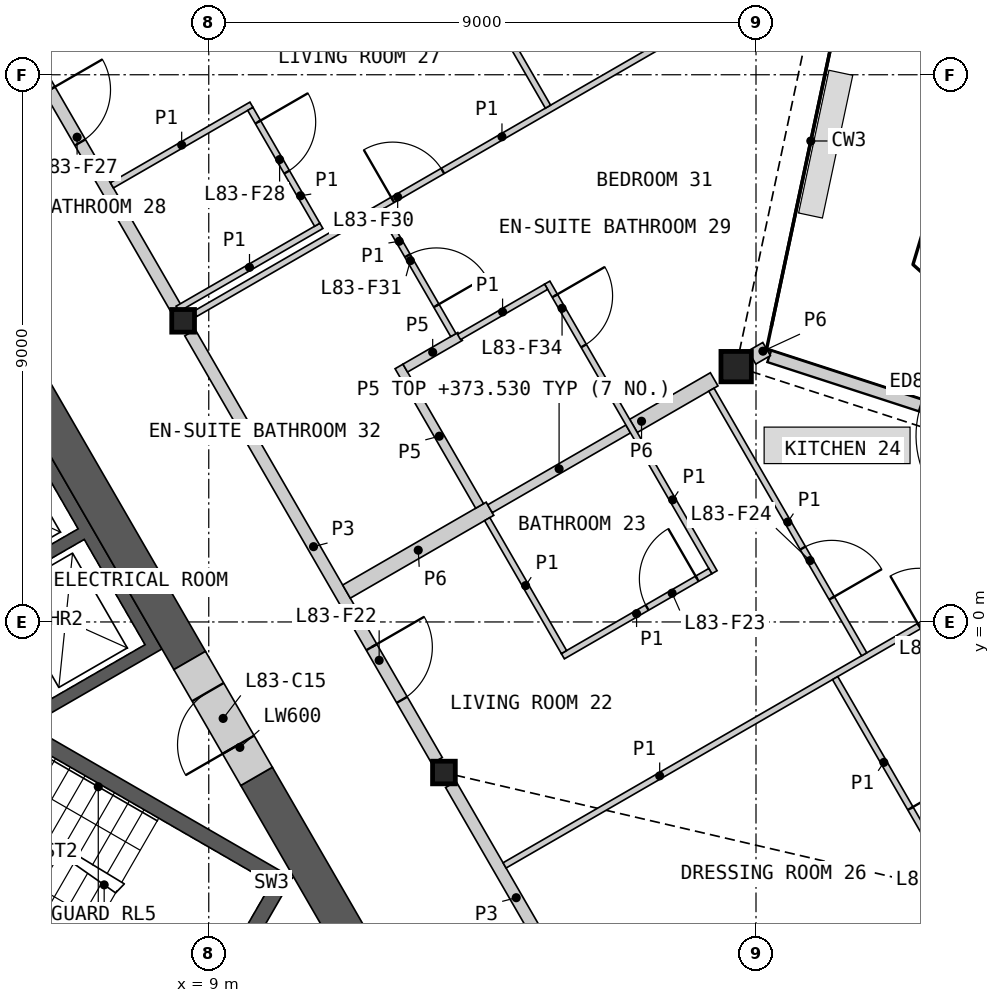
"""IFC4 building model, lengths in metres.
Left out: names, types, materials, properties, quantities, classifications, styles, units other than length and angle.
Written with IfcOpenShell. Run it as: python <this file> out.ifc"""

import sys

from ifc_helpers import new_model, si_unit, direction, frame, frame_2d, origin, origin_2d, place, context, subcontext, project, spatial, polyline, rectangle, hollow_rectangle, i_section, outline, extrude, element, fill, save


model = new_model("IFC4")
c1 = context("Model", 3, precision=1e-05, world=origin(), true_north=direction((0.0, 1.0)))
c2 = subcontext(c1, "Body", "Model", "MODEL_VIEW")
j1 = project(units=[si_unit("LENGTHUNIT", "METRE"), si_unit("PLANEANGLEUNIT", "RADIAN")], contexts=[c1])
p1 = place(None, origin())
s1 = spatial("IfcSite", under=j1, at=p1, CompositionType="ELEMENT")
p2 = place(p1, origin())
s2 = spatial("IfcBuilding", under=s1, at=p2, CompositionType="ELEMENT")
p3 = place(p2, frame((0.0, 0.0, 371.2)))
s3 = spatial("IfcBuildingStorey", under=s2, at=p3, CompositionType="ELEMENT", Elevation=371.2)
p4 = place(p3, frame((17.674, 4.199, 0.0), z_axis=(0.0, 0.0, 1.0), x_axis=(1.0, 0.0, 0.0)))
e1 = element("IfcColumn", 1, at=p4, inside=s3, PredefinedType="COLUMN", context=c2, shape_type="SweptSolid", body=[
    extrude(hollow_rectangle(XDim=0.5, YDim=0.5, WallThickness=0.03, at=origin_2d()), origin(), (0.0, 0.0, 1.0), 3.4),
])
for number, where, z_axis, x_axis in (
    (2, (12.868, -2.476, 0.0), (0.0, 0.0, 1.0), (1.0, 0.0, 0.0)),
    (3, (8.578, 4.953, 0.0), (0.0, 0.0, 1.0), (1.0, 0.0, 0.0)),
):
    element("IfcColumn", number, at=place(p3, frame(where, z_axis=z_axis, x_axis=x_axis)), inside=s3, PredefinedType="COLUMN", context=c2, shape_type="SweptSolid", body=[
        extrude(i_section(OverallWidth=0.374, OverallDepth=0.372, WebThickness=0.016, FlangeThickness=0.026, at=origin_2d()), origin(), (0.0, 0.0, 1.0), 3.4),
    ])
p5 = place(p3, frame((24.45, 2.344, 0.0), z_axis=(0.0, 0.0, 1.0), x_axis=(-0.951062538214, 0.308998460199, 0.0)))
e4 = element("IfcWall", 4, at=p5, inside=s3, PredefinedType="SOLIDWALL", context=c2, shape_type="SweptSolid", body=[
    extrude(rectangle(XDim=6.553, YDim=0.2, at=frame_2d((3.277, 0.0))), origin(), (0.0, 0.0, 1.0), 2.634),
])
p6 = place(p5, frame((2.333, 0.0, 0.0)))
e5 = element("IfcOpeningElement", 5, at=p6, cuts=e4, PredefinedType="OPENING", context=c2, shape_type="SweptSolid", body=[
    extrude(rectangle(XDim=1.6, YDim=2.25, at=frame_2d((0.8, 1.125))), frame((0.0, 0.11, 0.0), z_axis=(0.0, -1.0, 0.0), x_axis=(1.0, 0.0, 0.0)), (0.0, 0.0, 1.0), 0.22),
])
p7 = place(p3, origin())
e6 = element("IfcWall", 6, at=p7, inside=s3, PredefinedType="SHEAR", context=c2, shape_type="SweptSolid", body=[
    extrude(outline(polyline([(1.561, 6.097), (3.731, 7.35), (8.231, -0.444), (6.061, -1.697), (5.96, -1.524), (7.952, -0.374), (6.952, 1.358), (4.96, 0.208), (4.861, 0.381), (6.852, 1.531), (5.852, 3.263), (3.861, 2.113), (3.76, 2.287), (5.752, 3.437), (4.752, 5.169), (2.76, 4.019), (2.66, 4.192), (4.652, 5.342), (3.652, 7.074), (1.66, 5.924), (1.561, 6.097)])), origin(), (0.0, 0.0, 1.0), 3.1),
])
p8 = place(p3, origin())
e7 = element("IfcWall", 7, at=p8, inside=s3, PredefinedType="SHEAR", context=c2, shape_type="SweptSolid", body=[
    extrude(outline(polyline([(3.763, -3.956), (8.83, -6.881), (8.738, -6.539), (3.888, -3.739), (3.763, -3.956)])), origin(), (0.0, 0.0, 1.0), 3.1),
])
p9 = place(p3, origin())
e8 = element("IfcWall", 8, at=p9, inside=s3, PredefinedType="SHEAR", context=c2, shape_type="SweptSolid", body=[
    extrude(outline(polyline([(8.83, -6.881), (10.374, -4.206), (10.032, -4.298), (8.738, -6.539), (8.83, -6.881)])), origin(), (0.0, 0.0, 1.0), 3.1),
])
p10 = place(p3, origin())
e9 = element("IfcWall", 9, at=p10, inside=s3, PredefinedType="SHEAR", context=c2, shape_type="SweptSolid", body=[
    extrude(outline(polyline([(10.032, -4.298), (10.374, -4.206), (5.307, -1.281), (5.182, -1.498), (10.032, -4.298)])), origin(), (0.0, 0.0, 1.0), 3.1),
])
p11 = place(p3, frame((8.686, -0.634, 0.0), z_axis=(0.0, 0.0, 1.0), x_axis=(-0.500004601921, 0.866022746848, 0.0)))
e10 = element("IfcWall", 10, at=p11, inside=s3, PredefinedType="SHEAR", context=c2, shape_type="SweptSolid", body=[
    extrude(rectangle(XDim=16.853, YDim=0.6, at=frame_2d((8.426, 0.0))), origin(), (0.0, 0.0, 1.0), 3.1),
])
p12 = place(p3, frame((12.221, -6.756, 0.0), z_axis=(0.0, 0.0, 1.0), x_axis=(-0.50000604952, 0.866021911064, 0.0)))
e11 = element("IfcWall", 11, at=p12, inside=s3, PredefinedType="SHEAR", context=c2, shape_type="SweptSolid", body=[
    extrude(rectangle(XDim=4.869, YDim=0.6, at=frame_2d((2.434, 0.0))), origin(), (0.0, 0.0, 1.0), 3.1),
])
p13 = place(p3, frame((9.786, -2.539, 0.0), z_axis=(0.0, 0.0, 1.0), x_axis=(-0.499981787252, 0.866035918664, 0.0)))
e12 = element("IfcWall", 12, at=p13, inside=s3, PredefinedType="SHEAR", context=c2, shape_type="SweptSolid", body=[
    extrude(rectangle(XDim=2.2, YDim=0.6, at=frame_2d((1.1, 0.0))), origin(), (0.0, 0.0, 1.0), 3.1),
])
p14 = place(p13, frame((0.6, 0.0, 0.0)))
e13 = element("IfcOpeningElement", 13, at=p14, cuts=e12, PredefinedType="OPENING", context=c2, shape_type="SweptSolid", body=[
    extrude(rectangle(XDim=1.0, YDim=2.1, at=frame_2d((0.5, 1.05))), frame((0.0, 0.31, 0.0), z_axis=(0.0, -1.0, 0.0), x_axis=(1.0, 0.0, 0.0)), (0.0, 0.0, 1.0), 0.62),
])
p15 = place(p3, frame((4.403, 12.185, 0.0), z_axis=(0.0, 0.0, 1.0), x_axis=(0.499992155518, -0.866029932751, 0.0)))
e14 = element("IfcWall", 14, at=p15, inside=s3, PredefinedType="PARTITIONING", context=c2, shape_type="SweptSolid", body=[
    extrude(rectangle(XDim=8.123, YDim=0.2, at=frame_2d((4.062, 0.0))), origin(), (0.0, 0.0, 1.0), 3.1),
])
p16 = place(p15, frame((3.963, 0.0, 0.0)))
e15 = element("IfcOpeningElement", 15, at=p16, cuts=e14, PredefinedType="OPENING", context=c2, shape_type="SweptSolid", body=[
    extrude(rectangle(XDim=1.0, YDim=2.1, at=frame_2d((0.5, 1.05))), frame((0.0, 0.11, 0.0), z_axis=(0.0, -1.0, 0.0), x_axis=(1.0, 0.0, 0.0)), (0.0, 0.0, 1.0), 0.22),
])
p17 = place(p3, frame((8.692, 4.756, 0.0), z_axis=(0.0, 0.0, 1.0), x_axis=(0.500001682468, -0.866024432409, 0.0)))
e16 = element("IfcWall", 16, at=p17, inside=s3, PredefinedType="PARTITIONING", context=c2, shape_type="SweptSolid", body=[
    extrude(rectangle(XDim=8.124, YDim=0.2, at=frame_2d((4.062, 0.0))), origin(), (0.0, 0.0, 1.0), 3.1),
])
p18 = place(p17, frame((5.97, 0.0, 0.0)))
e17 = element("IfcOpeningElement", 17, at=p18, cuts=e16, PredefinedType="OPENING", context=c2, shape_type="SweptSolid", body=[
    extrude(rectangle(XDim=1.0, YDim=2.1, at=frame_2d((0.5, 1.05))), frame((0.0, 0.11, 0.0), z_axis=(0.0, -1.0, 0.0), x_axis=(1.0, 0.0, 0.0)), (0.0, 0.0, 1.0), 0.22),
])
p19 = place(p3, frame((12.981, -2.673, 0.0), z_axis=(0.0, 0.0, 1.0), x_axis=(0.499986217557, -0.866033360935, 0.0)))
e18 = element("IfcWall", 18, at=p19, inside=s3, PredefinedType="PARTITIONING", context=c2, shape_type="SweptSolid", body=[
    extrude(rectangle(XDim=4.3, YDim=0.2, at=frame_2d((2.15, 0.0))), origin(), (0.0, 0.0, 1.0), 3.1),
])
p20 = place(p3, frame((11.265, 0.5, 0.0), z_axis=(0.0, 0.0, 1.0), x_axis=(0.866051307416, 0.49995513091, 0.0)))
e19 = element("IfcWall", 19, at=p20, inside=s3, PredefinedType="PARTITIONING", context=c2, shape_type="SweptSolid", body=[
    extrude(rectangle(XDim=2.725, YDim=0.25, at=frame_2d((1.362, 0.0))), origin(), (0.0, 0.0, 1.0), 2.33),
])
p21 = place(p3, frame((15.985, 3.224, 0.0), z_axis=(0.0, 0.0, 1.0), x_axis=(0.865989259495, 0.50006259852, 0.0)))
e20 = element("IfcWall", 20, at=p21, inside=s3, PredefinedType="PARTITIONING", context=c2, shape_type="SweptSolid", body=[
    extrude(rectangle(XDim=1.532, YDim=0.25, at=frame_2d((0.766, 0.0))), origin(), (0.0, 0.0, 1.0), 2.33),
])
p22 = place(p3, frame((17.934, 4.35, 0.0), z_axis=(0.0, 0.0, 1.0), x_axis=(0.866288059981, 0.499544789918, 0.0)))
e21 = element("IfcWall", 21, at=p22, inside=s3, PredefinedType="PARTITIONING", context=c2, shape_type="SweptSolid", body=[
    extrude(rectangle(XDim=0.278, YDim=0.25, at=frame_2d((0.139, 0.0))), origin(), (0.0, 0.0, 1.0), 2.33),
])
p23 = place(p3, frame((13.625, 1.862, 0.0), z_axis=(0.0, 0.0, 1.0), x_axis=(0.866013657776, 0.500020344131, 0.0)))
e22 = element("IfcWall", 22, at=p23, inside=s3, PredefinedType="PLUMBINGWALL", context=c2, shape_type="SweptSolid", body=[
    extrude(rectangle(XDim=2.625, YDim=0.15, at=frame_2d((1.312, 0.0))), origin(), (0.0, 0.0, 1.0), 2.33),
])
p24 = place(p3, frame((12.129, 4.203, 0.0), z_axis=(0.0, 0.0, 1.0), x_axis=(0.499993606316, -0.866029095148, 0.0)))
e23 = element("IfcWall", 23, at=p24, inside=s3, PredefinedType="PLUMBINGWALL", context=c2, shape_type="SweptSolid", body=[
    extrude(rectangle(XDim=2.65, YDim=0.15, at=frame_2d((1.325, 0.0))), origin(), (0.0, 0.0, 1.0), 2.33),
])
p25 = place(p3, frame((12.232, 4.175, 0.0), z_axis=(0.0, 0.0, 1.0), x_axis=(0.866056787991, 0.499945637019, 0.0)))
e24 = element("IfcWall", 24, at=p25, inside=s3, PredefinedType="PLUMBINGWALL", context=c2, shape_type="SweptSolid", body=[
    extrude(rectangle(XDim=1.042, YDim=0.15, at=frame_2d((0.521, 0.0))), origin(), (0.0, 0.0, 1.0), 2.33),
])
p26 = place(p3, frame((13.865, -4.004, 0.0), z_axis=(0.0, 0.0, 1.0), x_axis=(0.866023404247, 0.500003463284, 0.0)))
e25 = element("IfcWall", 25, at=p26, inside=s3, PredefinedType="PARTITIONING", context=c2, shape_type="SweptSolid", body=[
    extrude(rectangle(XDim=11.782, YDim=0.1, at=frame_2d((5.891, 0.0))), origin(), (0.0, 0.0, 1.0), 2.33),
])
p27 = place(p26, frame((7.874, 0.0, 0.0)))
e26 = element("IfcOpeningElement", 26, at=p27, cuts=e25, PredefinedType="OPENING", context=c2, shape_type="SweptSolid", body=[
    extrude(rectangle(XDim=0.95, YDim=2.1, at=frame_2d((0.475, 1.05))), frame((0.0, 0.06, 0.0), z_axis=(0.0, -1.0, 0.0), x_axis=(1.0, 0.0, 0.0)), (0.0, 0.0, 1.0), 0.12),
])
p28 = place(p3, frame((8.775, 5.066, 0.0), z_axis=(0.0, 0.0, 1.0), x_axis=(0.866023724155, 0.500002909193, 0.0)))
e27 = element("IfcWall", 27, at=p28, inside=s3, PredefinedType="PARTITIONING", context=c2, shape_type="SweptSolid", body=[
    extrude(rectangle(XDim=11.655, YDim=0.1, at=frame_2d((5.827, 0.0))), origin(), (0.0, 0.0, 1.0), 2.33),
])
p29 = place(p28, frame((3.751, 0.0, 0.0)))
e28 = element("IfcOpeningElement", 28, at=p29, cuts=e27, PredefinedType="OPENING", context=c2, shape_type="SweptSolid", body=[
    extrude(rectangle(XDim=0.95, YDim=2.1, at=frame_2d((0.475, 1.05))), frame((0.0, 0.06, 0.0), z_axis=(0.0, -1.0, 0.0), x_axis=(1.0, 0.0, 0.0)), (0.0, 0.0, 1.0), 0.12),
])
p30 = place(p3, frame((19.302, -0.923, 0.0), z_axis=(0.0, 0.0, 1.0), x_axis=(0.499999516514, -0.866025682925, 0.0)))
e29 = element("IfcWall", 29, at=p30, inside=s3, PredefinedType="PARTITIONING", context=c2, shape_type="SweptSolid", body=[
    extrude(rectangle(XDim=6.407, YDim=0.1, at=frame_2d((3.204, 0.0))), origin(), (0.0, 0.0, 1.0), 2.33),
])
p31 = place(p30, frame((2.476, 0.0, 0.0)))
e30 = element("IfcOpeningElement", 30, at=p31, cuts=e29, PredefinedType="OPENING", context=c2, shape_type="SweptSolid", body=[
    extrude(rectangle(XDim=0.95, YDim=2.1, at=frame_2d((0.475, 1.05))), frame((0.0, 0.06, 0.0), z_axis=(0.0, -1.0, 0.0), x_axis=(1.0, 0.0, 0.0)), (0.0, 0.0, 1.0), 0.12),
])
p32 = place(p3, frame((14.567, 5.581, 0.0), z_axis=(0.0, 0.0, 1.0), x_axis=(0.499996545922, -0.866027397988, 0.0)))
e31 = element("IfcWall", 31, at=p32, inside=s3, PredefinedType="PARTITIONING", context=c2, shape_type="SweptSolid", body=[
    extrude(rectangle(XDim=5.5, YDim=0.1, at=frame_2d((2.75, 0.0))), origin(), (0.0, 0.0, 1.0), 2.33),
])
p33 = place(p32, frame((0.25, 0.0, 0.0)))
e32 = element("IfcOpeningElement", 32, at=p33, cuts=e31, PredefinedType="OPENING", context=c2, shape_type="SweptSolid", body=[
    extrude(rectangle(XDim=0.95, YDim=2.1, at=frame_2d((0.475, 1.05))), frame((0.0, 0.06, 0.0), z_axis=(0.0, -1.0, 0.0), x_axis=(1.0, 0.0, 0.0)), (0.0, 0.0, 1.0), 0.12),
])
p34 = place(p3, frame((12.029, 12.892, 0.0), z_axis=(0.0, 0.0, 1.0), x_axis=(0.500005610874, -0.86602216432, 0.0)))
e33 = element("IfcWall", 33, at=p34, inside=s3, PredefinedType="PARTITIONING", context=c2, shape_type="SweptSolid", body=[
    extrude(rectangle(XDim=5.1, YDim=0.1, at=frame_2d((2.55, 0.0))), origin(), (0.0, 0.0, 1.0), 2.33),
])
p35 = place(p34, frame((2.075, 0.0, 0.0)))
e34 = element("IfcOpeningElement", 34, at=p35, cuts=e33, PredefinedType="OPENING", context=c2, shape_type="SweptSolid", body=[
    extrude(rectangle(XDim=0.95, YDim=2.1, at=frame_2d((0.475, 1.05))), frame((0.0, 0.06, 0.0), z_axis=(0.0, -1.0, 0.0), x_axis=(1.0, 0.0, 0.0)), (0.0, 0.0, 1.0), 0.12),
])
p36 = place(p3, frame((17.266, 3.82, 0.0), z_axis=(0.0, 0.0, 1.0), x_axis=(0.499990214365, -0.86603105345, 0.0)))
e35 = element("IfcWall", 35, at=p36, inside=s3, PredefinedType="PARTITIONING", context=c2, shape_type="SweptSolid", body=[
    extrude(rectangle(XDim=5.025, YDim=0.1, at=frame_2d((2.512, 0.0))), origin(), (0.0, 0.0, 1.0), 2.33),
])
p37 = place(p36, frame((3.008, 0.0, 0.0)))
e36 = element("IfcOpeningElement", 36, at=p37, cuts=e35, PredefinedType="OPENING", context=c2, shape_type="SweptSolid", body=[
    extrude(rectangle(XDim=0.95, YDim=2.1, at=frame_2d((0.475, 1.05))), frame((0.0, 0.06, 0.0), z_axis=(0.0, -1.0, 0.0), x_axis=(1.0, 0.0, 0.0)), (0.0, 0.0, 1.0), 0.12),
])
p38 = place(p3, frame((14.823, -0.564, 0.0), z_axis=(0.0, 0.0, 1.0), x_axis=(0.866034573852, 0.49998411664, 0.0)))
e37 = element("IfcWall", 37, at=p38, inside=s3, PredefinedType="PARTITIONING", context=c2, shape_type="SweptSolid", body=[
    extrude(rectangle(XDim=2.8, YDim=0.1, at=frame_2d((1.4, 0.0))), origin(), (0.0, 0.0, 1.0), 2.33),
])
p39 = place(p38, frame((1.6, 0.0, 0.0)))
e38 = element("IfcOpeningElement", 38, at=p39, cuts=e37, PredefinedType="OPENING", context=c2, shape_type="SweptSolid", body=[
    extrude(rectangle(XDim=0.95, YDim=2.1, at=frame_2d((0.475, 1.05))), frame((0.0, 0.06, 0.0), z_axis=(0.0, -1.0, 0.0), x_axis=(1.0, 0.0, 0.0)), (0.0, 0.0, 1.0), 0.12),
])
p40 = place(p3, frame((13.579, 1.691, 0.0), z_axis=(0.0, 0.0, 1.0), x_axis=(0.500048846702, -0.865997200291, 0.0)))
e39 = element("IfcWall", 39, at=p40, inside=s3, PredefinedType="PARTITIONING", context=c2, shape_type="SweptSolid", body=[
    extrude(rectangle(XDim=2.525, YDim=0.1, at=frame_2d((1.263, 0.0))), origin(), (0.0, 0.0, 1.0), 2.33),
])
p41 = place(p3, frame((7.407, 7.182, 0.0), z_axis=(0.0, 0.0, 1.0), x_axis=(0.866052124492, 0.499953715521, 0.0)))
e40 = element("IfcWall", 40, at=p41, inside=s3, PredefinedType="PARTITIONING", context=c2, shape_type="SweptSolid", body=[
    extrude(rectangle(XDim=2.65, YDim=0.1, at=frame_2d((1.325, 0.0))), origin(), (0.0, 0.0, 1.0), 2.33),
])
p42 = place(p3, frame((8.488, 5.15, 0.0), z_axis=(0.0, 0.0, 1.0), x_axis=(0.866027727466, 0.499995975244, 0.0)))
e41 = element("IfcWall", 41, at=p42, inside=s3, PredefinedType="PARTITIONING", context=c2, shape_type="SweptSolid", body=[
    extrude(rectangle(XDim=2.73, YDim=0.1, at=frame_2d((1.365, 0.0))), origin(), (0.0, 0.0, 1.0), 2.33),
])
p43 = place(p3, frame((11.835, 6.775, 0.0), z_axis=(0.0, 0.0, 1.0), x_axis=(0.500030943131, -0.866007538022, 0.0)))
e42 = element("IfcWall", 42, at=p43, inside=s3, PredefinedType="PARTITIONING", context=c2, shape_type="SweptSolid", body=[
    extrude(rectangle(XDim=2.375, YDim=0.1, at=frame_2d((1.188, 0.0))), origin(), (0.0, 0.0, 1.0), 2.33),
])
p44 = place(p43, frame((0.867, 0.0, 0.0)))
e43 = element("IfcOpeningElement", 43, at=p44, cuts=e42, PredefinedType="OPENING", context=c2, shape_type="SweptSolid", body=[
    extrude(rectangle(XDim=0.95, YDim=2.1, at=frame_2d((0.475, 1.05))), frame((0.0, 0.06, 0.0), z_axis=(0.0, -1.0, 0.0), x_axis=(1.0, 0.0, 0.0)), (0.0, 0.0, 1.0), 0.12),
])
p45 = place(p3, frame((9.684, 8.438, 0.0), z_axis=(0.0, 0.0, 1.0), x_axis=(0.499994660107, -0.866028486751, 0.0)))
e44 = element("IfcWall", 44, at=p45, inside=s3, PredefinedType="PARTITIONING", context=c2, shape_type="SweptSolid", body=[
    extrude(rectangle(XDim=2.2, YDim=0.1, at=frame_2d((1.1, 0.0))), origin(), (0.0, 0.0, 1.0), 2.33),
])
p46 = place(p45, frame((0.25, 0.0, 0.0)))
e45 = element("IfcOpeningElement", 45, at=p46, cuts=e44, PredefinedType="OPENING", context=c2, shape_type="SweptSolid", body=[
    extrude(rectangle(XDim=0.95, YDim=2.1, at=frame_2d((0.475, 1.05))), frame((0.0, 0.06, 0.0), z_axis=(0.0, -1.0, 0.0), x_axis=(1.0, 0.0, 0.0)), (0.0, 0.0, 1.0), 0.12),
])
p47 = place(p3, frame((13.116, 4.686, 0.0), z_axis=(0.0, 0.0, 1.0), x_axis=(0.866072496716, 0.499918423778, 0.0)))
e46 = element("IfcWall", 46, at=p47, inside=s3, PredefinedType="PARTITIONING", context=c2, shape_type="SweptSolid", body=[
    extrude(rectangle(XDim=1.654, YDim=0.1, at=frame_2d((0.827, 0.0))), origin(), (0.0, 0.0, 1.0), 2.33),
])
p48 = place(p14, origin())
e47 = element("IfcDoor", 47, at=p48, inside=s3, OperationType="SINGLE_SWING_LEFT", PredefinedType="DOOR", context=c2, shape_type="SweptSolid", body=[
    extrude(rectangle(XDim=1.0, YDim=2.1, at=frame_2d((0.5, 1.05))), frame((0.0, 0.055, 0.0), z_axis=(0.0, -1.0, 0.0), x_axis=(1.0, 0.0, 0.0)), (0.0, 0.0, 1.0), 0.05),
])
fill(e13, e47)
p49 = place(p18, origin())
e48 = element("IfcDoor", 48, at=p49, inside=s3, OperationType="SINGLE_SWING_LEFT", PredefinedType="DOOR", context=c2, shape_type="SweptSolid", body=[
    extrude(rectangle(XDim=1.0, YDim=2.1, at=frame_2d((0.5, 1.05))), frame((0.0, 0.025, 0.0), z_axis=(0.0, -1.0, 0.0), x_axis=(1.0, 0.0, 0.0)), (0.0, 0.0, 1.0), 0.05),
])
fill(e17, e48)
p50 = place(p39, origin())
e49 = element("IfcDoor", 49, at=p50, inside=s3, OperationType="SINGLE_SWING_RIGHT", PredefinedType="DOOR", context=c2, shape_type="SweptSolid", body=[
    extrude(rectangle(XDim=0.95, YDim=2.1, at=frame_2d((0.475, 1.05))), frame((0.0, 0.025, 0.0), z_axis=(0.0, -1.0, 0.0), x_axis=(1.0, 0.0, 0.0)), (0.0, 0.0, 1.0), 0.05),
])
fill(e38, e49)
p51 = place(p37, origin())
e50 = element("IfcDoor", 50, at=p51, inside=s3, OperationType="SINGLE_SWING_RIGHT", PredefinedType="DOOR", context=c2, shape_type="SweptSolid", body=[
    extrude(rectangle(XDim=0.95, YDim=2.1, at=frame_2d((0.475, 1.05))), frame((0.0, 0.025, 0.0), z_axis=(0.0, -1.0, 0.0), x_axis=(1.0, 0.0, 0.0)), (0.0, 0.0, 1.0), 0.05),
])
fill(e36, e50)
p52 = place(p27, origin())
e51 = element("IfcDoor", 51, at=p52, inside=s3, OperationType="SINGLE_SWING_LEFT", PredefinedType="DOOR", context=c2, shape_type="SweptSolid", body=[
    extrude(rectangle(XDim=0.95, YDim=2.1, at=frame_2d((0.475, 1.05))), frame((0.0, 0.025, 0.0), z_axis=(0.0, -1.0, 0.0), x_axis=(1.0, 0.0, 0.0)), (0.0, 0.0, 1.0), 0.05),
])
fill(e26, e51)
p53 = place(p31, origin())
e52 = element("IfcDoor", 52, at=p53, inside=s3, OperationType="SINGLE_SWING_LEFT", PredefinedType="DOOR", context=c2, shape_type="SweptSolid", body=[
    extrude(rectangle(XDim=0.95, YDim=2.1, at=frame_2d((0.475, 1.05))), frame((0.0, 0.025, 0.0), z_axis=(0.0, -1.0, 0.0), x_axis=(1.0, 0.0, 0.0)), (0.0, 0.0, 1.0), 0.05),
])
fill(e30, e52)
p54 = place(p16, origin())
e53 = element("IfcDoor", 53, at=p54, inside=s3, OperationType="SINGLE_SWING_LEFT", PredefinedType="DOOR", context=c2, shape_type="SweptSolid", body=[
    extrude(rectangle(XDim=1.0, YDim=2.1, at=frame_2d((0.5, 1.05))), frame((0.0, 0.025, 0.0), z_axis=(0.0, -1.0, 0.0), x_axis=(1.0, 0.0, 0.0)), (0.0, 0.0, 1.0), 0.05),
])
fill(e15, e53)
p55 = place(p46, origin())
e54 = element("IfcDoor", 54, at=p55, inside=s3, OperationType="SINGLE_SWING_LEFT", PredefinedType="DOOR", context=c2, shape_type="SweptSolid", body=[
    extrude(rectangle(XDim=0.95, YDim=2.1, at=frame_2d((0.475, 1.05))), frame((0.0, 0.025, 0.0), z_axis=(0.0, -1.0, 0.0), x_axis=(1.0, 0.0, 0.0)), (0.0, 0.0, 1.0), 0.05),
])
fill(e45, e54)
p56 = place(p29, origin())
e55 = element("IfcDoor", 55, at=p56, inside=s3, OperationType="SINGLE_SWING_LEFT", PredefinedType="DOOR", context=c2, shape_type="SweptSolid", body=[
    extrude(rectangle(XDim=0.95, YDim=2.1, at=frame_2d((0.475, 1.05))), frame((0.0, 0.025, 0.0), z_axis=(0.0, -1.0, 0.0), x_axis=(1.0, 0.0, 0.0)), (0.0, 0.0, 1.0), 0.05),
])
fill(e28, e55)
p57 = place(p44, origin())
e56 = element("IfcDoor", 56, at=p57, inside=s3, OperationType="SINGLE_SWING_RIGHT", PredefinedType="DOOR", context=c2, shape_type="SweptSolid", body=[
    extrude(rectangle(XDim=0.95, YDim=2.1, at=frame_2d((0.475, 1.05))), frame((0.0, 0.025, 0.0), z_axis=(0.0, -1.0, 0.0), x_axis=(1.0, 0.0, 0.0)), (0.0, 0.0, 1.0), 0.05),
])
fill(e43, e56)
p58 = place(p33, origin())
e57 = element("IfcDoor", 57, at=p58, inside=s3, OperationType="SINGLE_SWING_LEFT", PredefinedType="DOOR", context=c2, shape_type="SweptSolid", body=[
    extrude(rectangle(XDim=0.95, YDim=2.1, at=frame_2d((0.475, 1.05))), frame((0.0, 0.025, 0.0), z_axis=(0.0, -1.0, 0.0), x_axis=(1.0, 0.0, 0.0)), (0.0, 0.0, 1.0), 0.05),
])
fill(e32, e57)
save(model, sys.argv[1])
